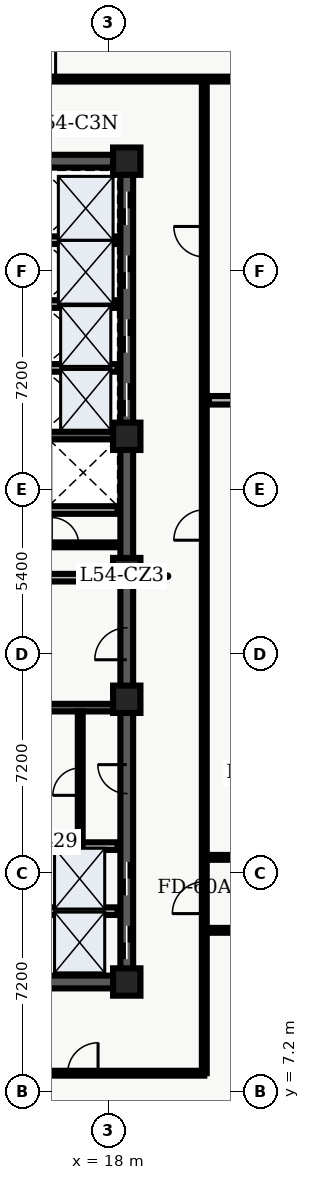
"""IFC4 building model, lengths in metres.
Left out: names, types, materials, properties, quantities, classifications, styles, units other than length and angle.
Written with IfcOpenShell. Run it as: python <this file> out.ifc"""

import sys

from ifc_helpers import new_model, entity, si_unit, converted_unit, direction, frame, origin_with_axes, origin_2d_with_axis, place, context, subcontext, project, spatial, polyline, rectangle, outline, extrude, element, fill, save


model = new_model("IFC4")
c1 = context("Model", 3, precision=1e-05, world=origin_with_axes(), true_north=direction((0.0, 1.0)))
c2 = subcontext(c1, "Body", "Model", "MODEL_VIEW")
j1 = project(units=[si_unit("LENGTHUNIT", "METRE"), converted_unit("PLANEANGLEUNIT", "DEGREE", entity("IfcPlaneAngleMeasure", 0.017), si_unit("PLANEANGLEUNIT", "RADIAN"), dimensions=[0, 0, 0, 0, 0, 0, 0])], contexts=[c1])
p1 = place(None, origin_with_axes())
s1 = spatial("IfcSite", under=j1, at=p1, CompositionType="ELEMENT")
p2 = place(p1, origin_with_axes())
s2 = spatial("IfcBuilding", under=s1, at=p2, CompositionType="ELEMENT")
p3 = place(p2, frame((0.0, 0.0, 219.9), z_axis=(0.0, 0.0, 1.0), x_axis=(1.0, 0.0, 0.0)))
s3 = spatial("IfcBuildingStorey", under=s2, at=p3, CompositionType="ELEMENT", Elevation=219.9)
p4 = place(p3, frame((11.4, 10.8, 0.0), z_axis=(0.0, 0.0, 1.0), x_axis=(1.0, 0.0, 0.0)))
e1 = element("IfcWall", 1, at=p4, inside=s3, PredefinedType="SHEAR", context=c2, shape_type="SweptSolid", body=[
    extrude(outline(polyline([(0.0, -0.21), (7.2, -0.21), (7.2, 0.21), (0.0, 0.21), (0.0, -0.21)])), origin_with_axes(), (0.0, 0.0, 1.0), 4.56),
])
p5 = place(p4, frame((2.625, 0.0, 0.0), z_axis=(0.0, 0.0, 1.0), x_axis=(1.0, 0.0, 0.0)))
e2 = element("IfcOpeningElement", 2, at=p5, cuts=e1, PredefinedType="OPENING", context=c2, shape_type="SweptSolid", body=[
    extrude(rectangle(XDim=1.05, YDim=0.44, at=origin_2d_with_axis()), origin_with_axes(), (0.0, 0.0, 1.0), 2.15),
])
p6 = place(p3, frame((11.4, 37.8, 0.0), z_axis=(0.0, 0.0, 1.0), x_axis=(1.0, 0.0, 0.0)))
e3 = element("IfcWall", 3, at=p6, inside=s3, PredefinedType="SHEAR", context=c2, shape_type="SweptSolid", body=[
    extrude(outline(polyline([(0.0, -0.21), (7.2, -0.21), (7.2, 0.21), (0.0, 0.21), (0.0, -0.21)])), origin_with_axes(), (0.0, 0.0, 1.0), 4.56),
])
p7 = place(p6, frame((2.625, 0.0, 0.0), z_axis=(0.0, 0.0, 1.0), x_axis=(1.0, 0.0, 0.0)))
e4 = element("IfcOpeningElement", 4, at=p7, cuts=e3, PredefinedType="OPENING", context=c2, shape_type="SweptSolid", body=[
    extrude(rectangle(XDim=1.05, YDim=0.44, at=origin_2d_with_axis()), origin_with_axes(), (0.0, 0.0, 1.0), 2.15),
])
p8 = place(p3, frame((18.6, 10.8, 0.0), z_axis=(0.0, 0.0, 1.0), x_axis=(0.0, 1.0, 0.0)))
e5 = element("IfcWall", 5, at=p8, inside=s3, PredefinedType="SHEAR", context=c2, shape_type="SweptSolid", body=[
    extrude(outline(polyline([(0.0, -0.21), (13.5, -0.21), (13.5, 0.21), (0.0, 0.21), (0.0, -0.21)])), origin_with_axes(), (0.0, 0.0, 1.0), 4.56),
])
p9 = place(p8, frame((1.3, 0.0, 0.0), z_axis=(0.0, 0.0, 1.0), x_axis=(1.0, 0.0, 0.0)))
e6 = element("IfcOpeningElement", 6, at=p9, cuts=e5, PredefinedType="OPENING", context=c2, shape_type="SweptSolid", body=[
    extrude(rectangle(XDim=1.1, YDim=0.44, at=origin_2d_with_axis()), origin_with_axes(), (0.0, 0.0, 1.0), 2.15),
])
p10 = place(p8, frame((3.4, 0.0, 0.0), z_axis=(0.0, 0.0, 1.0), x_axis=(1.0, 0.0, 0.0)))
e7 = element("IfcOpeningElement", 7, at=p10, cuts=e5, PredefinedType="OPENING", context=c2, shape_type="SweptSolid", body=[
    extrude(rectangle(XDim=1.1, YDim=0.44, at=origin_2d_with_axis()), origin_with_axes(), (0.0, 0.0, 1.0), 2.15),
])
p11 = place(p8, frame((11.125, 0.0, 0.0), z_axis=(0.0, 0.0, 1.0), x_axis=(1.0, 0.0, 0.0)))
e8 = element("IfcOpeningElement", 8, at=p11, cuts=e5, PredefinedType="OPENING", context=c2, shape_type="SweptSolid", body=[
    extrude(rectangle(XDim=1.05, YDim=0.44, at=origin_2d_with_axis()), origin_with_axes(), (0.0, 0.0, 1.0), 2.15),
])
p12 = place(p8, frame((6.675, 0.0, 0.0), z_axis=(0.0, 0.0, 1.0), x_axis=(1.0, 0.0, 0.0)))
e9 = element("IfcOpeningElement", 9, at=p12, cuts=e5, PredefinedType="OPENING", context=c2, shape_type="SweptSolid", body=[
    extrude(rectangle(XDim=0.95, YDim=0.44, at=origin_2d_with_axis()), origin_with_axes(), (0.0, 0.0, 1.0), 2.15),
])
p13 = place(p3, frame((18.6, 24.3, 0.0), z_axis=(0.0, 0.0, 1.0), x_axis=(0.0, 1.0, 0.0)))
e10 = element("IfcWall", 10, at=p13, inside=s3, PredefinedType="SHEAR", context=c2, shape_type="SweptSolid", body=[
    extrude(outline(polyline([(0.0, -0.21), (13.5, -0.21), (13.5, 0.21), (0.0, 0.21), (0.0, -0.21)])), origin_with_axes(), (0.0, 0.0, 1.0), 4.56),
])
p14 = place(p13, frame((5.65, 0.0, 0.0), z_axis=(0.0, 0.0, 1.0), x_axis=(1.0, 0.0, 0.0)))
e11 = element("IfcOpeningElement", 11, at=p14, cuts=e10, PredefinedType="OPENING", context=c2, shape_type="SweptSolid", body=[
    extrude(rectangle(XDim=1.1, YDim=0.44, at=origin_2d_with_axis()), origin_with_axes(), (0.0, 0.0, 1.0), 2.15),
])
p15 = place(p13, frame((7.75, 0.0, 0.0), z_axis=(0.0, 0.0, 1.0), x_axis=(1.0, 0.0, 0.0)))
e12 = element("IfcOpeningElement", 12, at=p15, cuts=e10, PredefinedType="OPENING", context=c2, shape_type="SweptSolid", body=[
    extrude(rectangle(XDim=1.1, YDim=0.44, at=origin_2d_with_axis()), origin_with_axes(), (0.0, 0.0, 1.0), 2.15),
])
p16 = place(p13, frame((9.85, 0.0, 0.0), z_axis=(0.0, 0.0, 1.0), x_axis=(1.0, 0.0, 0.0)))
e13 = element("IfcOpeningElement", 13, at=p16, cuts=e10, PredefinedType="OPENING", context=c2, shape_type="SweptSolid", body=[
    extrude(rectangle(XDim=1.1, YDim=0.44, at=origin_2d_with_axis()), origin_with_axes(), (0.0, 0.0, 1.0), 2.15),
])
p17 = place(p13, frame((11.95, 0.0, 0.0), z_axis=(0.0, 0.0, 1.0), x_axis=(1.0, 0.0, 0.0)))
e14 = element("IfcOpeningElement", 14, at=p17, cuts=e10, PredefinedType="OPENING", context=c2, shape_type="SweptSolid", body=[
    extrude(rectangle(XDim=1.1, YDim=0.44, at=origin_2d_with_axis()), origin_with_axes(), (0.0, 0.0, 1.0), 2.15),
])
for number, where, z_axis, x_axis in (
    (15, (11.61, 19.825, 0.0), (0.0, 0.0, 1.0), (1.0, 0.0, 0.0)),
    (16, (11.61, 28.775, 0.0), (0.0, 0.0, 1.0), (1.0, 0.0, 0.0)),
):
    element("IfcWall", number, at=place(p3, frame(where, z_axis=z_axis, x_axis=x_axis)), inside=s3, PredefinedType="SHEAR", context=c2, shape_type="SweptSolid", body=[
        extrude(outline(polyline([(0.0, -0.125), (6.78, -0.125), (6.78, 0.125), (0.0, 0.125), (0.0, -0.125)])), origin_with_axes(), (0.0, 0.0, 1.0), 4.56),
    ])
p18 = place(p3, frame((11.7, 24.1, 0.0), z_axis=(0.0, 0.0, 1.0), x_axis=(1.0, 0.0, 0.0)))
e17 = element("IfcWall", 17, at=p18, inside=s3, PredefinedType="SOLIDWALL", context=c2, shape_type="SweptSolid", body=[
    extrude(outline(polyline([(0.0, -0.125), (6.6, -0.125), (6.6, 0.125), (0.0, 0.125), (0.0, -0.125)])), origin_with_axes(), (0.0, 0.0, 1.0), 3.6),
])
p19 = place(p18, frame((3.75, 0.0, 0.0), z_axis=(0.0, 0.0, 1.0), x_axis=(1.0, 0.0, 0.0)))
e18 = element("IfcOpeningElement", 18, at=p19, cuts=e17, PredefinedType="OPENING", context=c2, shape_type="SweptSolid", body=[
    extrude(rectangle(XDim=0.9, YDim=0.27, at=origin_2d_with_axis()), origin_with_axes(), (0.0, 0.0, 1.0), 2.15),
])
p20 = place(p3, frame((11.7, 26.325, 0.0), z_axis=(0.0, 0.0, 1.0), x_axis=(1.0, 0.0, 0.0)))
e19 = element("IfcWall", 19, at=p20, inside=s3, PredefinedType="SOLIDWALL", context=c2, shape_type="SweptSolid", body=[
    extrude(outline(polyline([(0.0, -0.125), (6.6, -0.125), (6.6, 0.125), (0.0, 0.125), (0.0, -0.125)])), origin_with_axes(), (0.0, 0.0, 1.0), 3.6),
])
p21 = place(p20, frame((3.5, 0.0, 0.0), z_axis=(0.0, 0.0, 1.0), x_axis=(1.0, 0.0, 0.0)))
e20 = element("IfcOpeningElement", 20, at=p21, cuts=e19, PredefinedType="OPENING", context=c2, shape_type="SweptSolid", body=[
    extrude(rectangle(XDim=0.9, YDim=0.27, at=origin_2d_with_axis()), origin_with_axes(), (0.0, 0.0, 1.0), 2.15),
])
for number, where, z_axis, x_axis in (
    (21, (18.6, 10.8, 0.0), (0.0, 0.0, 1.0), (1.0, 0.0, 0.0)),
    (22, (18.6, 20.1, 0.0), (0.0, 0.0, 1.0), (1.0, 0.0, 0.0)),
    (23, (18.6, 24.3, 0.0), (0.0, 0.0, 1.0), (1.0, 0.0, 0.0)),
    (24, (18.6, 28.75, 0.0), (0.0, 0.0, 1.0), (1.0, 0.0, 0.0)),
    (25, (18.6, 37.8, 0.0), (0.0, 0.0, 1.0), (1.0, 0.0, 0.0)),
):
    element("IfcColumn", number, at=place(p3, frame(where, z_axis=z_axis, x_axis=x_axis)), inside=s3, PredefinedType="COLUMN", context=c2, shape_type="SweptSolid", body=[
        extrude(rectangle(XDim=0.9, YDim=0.9, at=origin_2d_with_axis()), origin_with_axes(), (0.0, 0.0, 1.0), 4.8),
    ])
p22 = place(p3, frame((14.62, 25.18, 0.0), z_axis=(0.0, 0.0, 1.0), x_axis=(1.0, 0.0, 0.0)))
e26 = element("IfcWall", 26, at=p22, inside=s3, PredefinedType="PARTITIONING", context=c2, shape_type="SweptSolid", body=[
    extrude(outline(polyline([(0.0, -0.08), (3.68, -0.08), (3.68, 0.08), (0.0, 0.08), (0.0, -0.08)])), origin_with_axes(), (0.0, 0.0, 1.0), 3.2),
])
p23 = place(p22, frame((1.95, 0.0, 0.0), z_axis=(0.0, 0.0, 1.0), x_axis=(1.0, 0.0, 0.0)))
e27 = element("IfcOpeningElement", 27, at=p23, cuts=e26, PredefinedType="OPENING", context=c2, shape_type="SweptSolid", body=[
    extrude(rectangle(XDim=0.9, YDim=0.18, at=origin_2d_with_axis()), origin_with_axes(), (0.0, 0.0, 1.0), 2.15),
])
for number, where, z_axis, x_axis in (
    (28, (15.84, 13.13, 0.0), (0.0, 0.0, 1.0), (1.0, 0.0, 0.0)),
    (29, (15.84, 15.27, 0.0), (0.0, 0.0, 1.0), (1.0, 0.0, 0.0)),
):
    element("IfcWall", number, at=place(p3, frame(where, z_axis=z_axis, x_axis=x_axis)), inside=s3, PredefinedType="SOLIDWALL", context=c2, shape_type="SweptSolid", body=[
        extrude(outline(polyline([(0.0, -0.125), (2.46, -0.125), (2.46, 0.125), (0.0, 0.125), (0.0, -0.125)])), origin_with_axes(), (0.0, 0.0, 1.0), 3.2),
    ])
p24 = place(p3, frame((17.07, 15.34, 0.0), z_axis=(0.0, 0.0, 1.0), x_axis=(0.0, 1.0, 0.0)))
e30 = element("IfcWall", 30, at=p24, inside=s3, PredefinedType="PARTITIONING", context=c2, shape_type="SweptSolid", body=[
    extrude(outline(polyline([(0.0, -0.08), (4.36, -0.08), (4.36, 0.08), (0.0, 0.08), (0.0, -0.08)])), origin_with_axes(), (0.0, 0.0, 1.0), 3.2),
])
p25 = place(p24, frame((2.05, 0.0, 0.0), z_axis=(0.0, 0.0, 1.0), x_axis=(1.0, 0.0, 0.0)))
e31 = element("IfcOpeningElement", 31, at=p25, cuts=e30, PredefinedType="OPENING", context=c2, shape_type="SweptSolid", body=[
    extrude(rectangle(XDim=0.9, YDim=0.18, at=origin_2d_with_axis()), origin_with_axes(), (0.0, 0.0, 1.0), 2.15),
])
for number, where, z_axis, x_axis in (
    (32, (15.84, 31.0, 0.0), (0.0, 0.0, 1.0), (1.0, 0.0, 0.0)),
    (33, (15.84, 33.1, 0.0), (0.0, 0.0, 1.0), (1.0, 0.0, 0.0)),
    (34, (15.84, 35.2, 0.0), (0.0, 0.0, 1.0), (1.0, 0.0, 0.0)),
):
    element("IfcWall", number, at=place(p3, frame(where, z_axis=z_axis, x_axis=x_axis)), inside=s3, PredefinedType="SOLIDWALL", context=c2, shape_type="SweptSolid", body=[
        extrude(outline(polyline([(0.0, -0.125), (2.46, -0.125), (2.46, 0.125), (0.0, 0.125), (0.0, -0.125)])), origin_with_axes(), (0.0, 0.0, 1.0), 3.2),
    ])
p26 = place(p3, frame((7.1, 7.8, 0.0), z_axis=(0.0, 0.0, 1.0), x_axis=(1.0, 0.0, 0.0)))
e35 = element("IfcWall", 35, at=p26, inside=s3, PredefinedType="PARTITIONING", context=c2, shape_type="SweptSolid", body=[
    extrude(outline(polyline([(0.0, -0.08), (14.05, -0.08), (14.05, 0.08), (0.0, 0.08), (0.0, -0.08)])), origin_with_axes(), (0.0, 0.0, 1.0), 3.2),
])
p27 = place(p26, frame((3.051, 0.0, 0.0), z_axis=(0.0, 0.0, 1.0), x_axis=(1.0, 0.0, 0.0)))
e36 = element("IfcOpeningElement", 36, at=p27, cuts=e35, PredefinedType="OPENING", context=c2, shape_type="SweptSolid", body=[
    extrude(rectangle(XDim=1.0, YDim=0.18, at=origin_2d_with_axis()), origin_with_axes(), (0.0, 0.0, 1.0), 2.15),
])
p28 = place(p26, frame((10.056, 0.0, 0.0), z_axis=(0.0, 0.0, 1.0), x_axis=(1.0, 0.0, 0.0)))
e37 = element("IfcOpeningElement", 37, at=p28, cuts=e35, PredefinedType="OPENING", context=c2, shape_type="SweptSolid", body=[
    extrude(rectangle(XDim=1.0, YDim=0.18, at=origin_2d_with_axis()), origin_with_axes(), (0.0, 0.0, 1.0), 2.15),
])
p29 = place(p3, frame((7.1, 40.5, 0.0), z_axis=(0.0, 0.0, 1.0), x_axis=(1.0, 0.0, 0.0)))
e38 = element("IfcWall", 38, at=p29, inside=s3, PredefinedType="PARTITIONING", context=c2, shape_type="SweptSolid", body=[
    extrude(outline(polyline([(0.0, -0.08), (24.965, -0.08), (24.965, 0.08), (0.0, 0.08), (0.0, -0.08)])), origin_with_axes(), (0.0, 0.0, 1.0), 3.2),
])
p30 = place(p29, frame((3.395, 0.0, 0.0), z_axis=(0.0, 0.0, 1.0), x_axis=(1.0, 0.0, 0.0)))
e39 = element("IfcOpeningElement", 39, at=p30, cuts=e38, PredefinedType="OPENING", context=c2, shape_type="SweptSolid", body=[
    extrude(rectangle(XDim=1.0, YDim=0.18, at=origin_2d_with_axis()), origin_with_axes(), (0.0, 0.0, 1.0), 2.15),
])
p31 = place(p29, frame((8.66, 0.0, 0.0), z_axis=(0.0, 0.0, 1.0), x_axis=(1.0, 0.0, 0.0)))
e40 = element("IfcOpeningElement", 40, at=p31, cuts=e38, PredefinedType="OPENING", context=c2, shape_type="SweptSolid", body=[
    extrude(rectangle(XDim=1.0, YDim=0.18, at=origin_2d_with_axis()), origin_with_axes(), (0.0, 0.0, 1.0), 2.15),
])
p32 = place(p3, frame((21.15, 7.8, 0.0), z_axis=(0.0, 0.0, 1.0), x_axis=(0.0, 1.0, 0.0)))
e41 = element("IfcWall", 41, at=p32, inside=s3, PredefinedType="PARTITIONING", context=c2, shape_type="SweptSolid", body=[
    extrude(outline(polyline([(0.0, -0.08), (32.7, -0.08), (32.7, 0.08), (0.0, 0.08), (0.0, -0.08)])), origin_with_axes(), (0.0, 0.0, 1.0), 3.2),
])
p33 = place(p32, frame((18.032, 0.0, 0.0), z_axis=(0.0, 0.0, 1.0), x_axis=(1.0, 0.0, 0.0)))
e42 = element("IfcOpeningElement", 42, at=p33, cuts=e41, PredefinedType="OPENING", context=c2, shape_type="SweptSolid", body=[
    extrude(rectangle(XDim=1.0, YDim=0.18, at=origin_2d_with_axis()), origin_with_axes(), (0.0, 0.0, 1.0), 2.15),
])
p34 = place(p32, frame((27.352, 0.0, 0.0), z_axis=(0.0, 0.0, 1.0), x_axis=(1.0, 0.0, 0.0)))
e43 = element("IfcOpeningElement", 43, at=p34, cuts=e41, PredefinedType="OPENING", context=c2, shape_type="SweptSolid", body=[
    extrude(rectangle(XDim=1.0, YDim=0.18, at=origin_2d_with_axis()), origin_with_axes(), (0.0, 0.0, 1.0), 2.15),
])
p35 = place(p32, frame((5.775, 0.0, 0.0), z_axis=(0.0, 0.0, 1.0), x_axis=(1.0, 0.0, 0.0)))
e44 = element("IfcOpeningElement", 44, at=p35, cuts=e41, PredefinedType="OPENING", context=c2, shape_type="SweptSolid", body=[
    extrude(rectangle(XDim=1.05, YDim=0.18, at=origin_2d_with_axis()), origin_with_axes(), (0.0, 0.0, 1.0), 2.15),
])
p36 = place(p3, frame((21.3, 29.935, 0.0), z_axis=(0.0, 0.0, 1.0), x_axis=(1.0, 0.0, 0.0)))
e45 = element("IfcWall", 45, at=p36, inside=s3, PredefinedType="PARTITIONING", context=c2, shape_type="SweptSolid", body=[
    extrude(outline(polyline([(0.0, -0.14), (10.765, -0.14), (10.765, 0.14), (0.0, 0.14), (0.0, -0.14)])), origin_with_axes(), (0.0, 0.0, 1.0), 3.2),
])
p37 = place(p3, frame((21.15, 12.5, 0.0), z_axis=(0.0, 0.0, 1.0), x_axis=(1.0, 0.0, 0.0)))
e46 = element("IfcWall", 46, at=p37, inside=s3, PredefinedType="PARTITIONING", context=c2, shape_type="SweptSolid", body=[
    extrude(outline(polyline([(0.0, -0.08), (15.2, -0.08), (15.2, 0.08), (0.0, 0.08), (0.0, -0.08)])), origin_with_axes(), (0.0, 0.0, 1.0), 3.2),
])
p38 = place(p37, frame((7.65, 0.0, 0.0), z_axis=(0.0, 0.0, 1.0), x_axis=(1.0, 0.0, 0.0)))
e47 = element("IfcOpeningElement", 47, at=p38, cuts=e46, PredefinedType="OPENING", context=c2, shape_type="SweptSolid", body=[
    extrude(rectangle(XDim=1.0, YDim=0.18, at=origin_2d_with_axis()), origin_with_axes(), (0.0, 0.0, 1.0), 2.15),
])
p39 = place(p3, frame((21.15, 14.9, 0.0), z_axis=(0.0, 0.0, 1.0), x_axis=(1.0, 0.0, 0.0)))
e48 = element("IfcWall", 48, at=p39, inside=s3, PredefinedType="PARTITIONING", context=c2, shape_type="SweptSolid", body=[
    extrude(outline(polyline([(0.0, -0.08), (15.2, -0.08), (15.2, 0.08), (0.0, 0.08), (0.0, -0.08)])), origin_with_axes(), (0.0, 0.0, 1.0), 3.2),
])
p40 = place(p39, frame((3.583, 0.0, 0.0), z_axis=(0.0, 0.0, 1.0), x_axis=(1.0, 0.0, 0.0)))
e49 = element("IfcOpeningElement", 49, at=p40, cuts=e48, PredefinedType="OPENING", context=c2, shape_type="SweptSolid", body=[
    extrude(rectangle(XDim=1.0, YDim=0.18, at=origin_2d_with_axis()), origin_with_axes(), (0.0, 0.0, 1.0), 2.15),
])
p41 = place(p39, frame((11.053, 0.0, 0.0), z_axis=(0.0, 0.0, 1.0), x_axis=(1.0, 0.0, 0.0)))
e50 = element("IfcOpeningElement", 50, at=p41, cuts=e48, PredefinedType="OPENING", context=c2, shape_type="SweptSolid", body=[
    extrude(rectangle(XDim=1.0, YDim=0.18, at=origin_2d_with_axis()), origin_with_axes(), (0.0, 0.0, 1.0), 2.15),
])
p42 = place(p13, frame((5.65, 0.0, 0.0), z_axis=(0.0, 0.0, 1.0), x_axis=(1.0, 0.0, 0.0)))
e51 = element("IfcDoor", 51, at=p42, inside=s3, OperationType="SLIDING_TO_LEFT", PredefinedType="DOOR", context=c2, shape_type="SweptSolid", body=[
    extrude(rectangle(XDim=1.1, YDim=0.09, at=origin_2d_with_axis()), origin_with_axes(), (0.0, 0.0, 1.0), 2.15),
])
fill(e11, e51)
p43 = place(p13, frame((7.75, 0.0, 0.0), z_axis=(0.0, 0.0, 1.0), x_axis=(1.0, 0.0, 0.0)))
e52 = element("IfcDoor", 52, at=p43, inside=s3, OperationType="SLIDING_TO_RIGHT", PredefinedType="DOOR", context=c2, shape_type="SweptSolid", body=[
    extrude(rectangle(XDim=1.1, YDim=0.09, at=origin_2d_with_axis()), origin_with_axes(), (0.0, 0.0, 1.0), 2.15),
])
fill(e12, e52)
p44 = place(p13, frame((9.85, 0.0, 0.0), z_axis=(0.0, 0.0, 1.0), x_axis=(1.0, 0.0, 0.0)))
e53 = element("IfcDoor", 53, at=p44, inside=s3, OperationType="DOUBLE_DOOR_SLIDING", PredefinedType="DOOR", context=c2, shape_type="SweptSolid", body=[
    extrude(rectangle(XDim=1.1, YDim=0.09, at=origin_2d_with_axis()), origin_with_axes(), (0.0, 0.0, 1.0), 2.15),
])
fill(e13, e53)
p45 = place(p13, frame((11.95, 0.0, 0.0), z_axis=(0.0, 0.0, 1.0), x_axis=(1.0, 0.0, 0.0)))
e54 = element("IfcDoor", 54, at=p45, inside=s3, OperationType="DOUBLE_DOOR_SLIDING", PredefinedType="DOOR", context=c2, shape_type="SweptSolid", body=[
    extrude(rectangle(XDim=1.1, YDim=0.09, at=origin_2d_with_axis()), origin_with_axes(), (0.0, 0.0, 1.0), 2.15),
])
fill(e14, e54)
p46 = place(p8, frame((1.3, 0.0, 0.0), z_axis=(0.0, 0.0, 1.0), x_axis=(1.0, 0.0, 0.0)))
e55 = element("IfcDoor", 55, at=p46, inside=s3, OperationType="SLIDING_TO_LEFT", PredefinedType="DOOR", context=c2, shape_type="SweptSolid", body=[
    extrude(rectangle(XDim=1.1, YDim=0.09, at=origin_2d_with_axis()), origin_with_axes(), (0.0, 0.0, 1.0), 2.15),
])
fill(e6, e55)
p47 = place(p8, frame((3.4, 0.0, 0.0), z_axis=(0.0, 0.0, 1.0), x_axis=(1.0, 0.0, 0.0)))
e56 = element("IfcDoor", 56, at=p47, inside=s3, OperationType="SLIDING_TO_RIGHT", PredefinedType="DOOR", context=c2, shape_type="SweptSolid", body=[
    extrude(rectangle(XDim=1.1, YDim=0.09, at=origin_2d_with_axis()), origin_with_axes(), (0.0, 0.0, 1.0), 2.15),
])
fill(e7, e56)
p48 = place(p8, frame((11.125, 0.0, 0.0), z_axis=(0.0, 0.0, 1.0), x_axis=(1.0, 0.0, 0.0)))
e57 = element("IfcDoor", 57, at=p48, inside=s3, OperationType="SINGLE_SWING_LEFT", PredefinedType="DOOR", context=c2, shape_type="SweptSolid", body=[
    extrude(rectangle(XDim=1.05, YDim=0.09, at=origin_2d_with_axis()), origin_with_axes(), (0.0, 0.0, 1.0), 2.15),
])
fill(e8, e57)
p49 = place(p22, frame((1.95, 0.0, 0.0), z_axis=(0.0, 0.0, 1.0), x_axis=(1.0, 0.0, 0.0)))
e58 = element("IfcDoor", 58, at=p49, inside=s3, OperationType="SINGLE_SWING_LEFT", PredefinedType="DOOR", context=c2, shape_type="SweptSolid", body=[
    extrude(rectangle(XDim=0.9, YDim=0.09, at=origin_2d_with_axis()), origin_with_axes(), (0.0, 0.0, 1.0), 2.15),
])
fill(e27, e58)
p50 = place(p24, frame((2.05, 0.0, 0.0), z_axis=(0.0, 0.0, 1.0), x_axis=(1.0, 0.0, 0.0)))
e59 = element("IfcDoor", 59, at=p50, inside=s3, OperationType="SINGLE_SWING_LEFT", PredefinedType="DOOR", context=c2, shape_type="SweptSolid", body=[
    extrude(rectangle(XDim=0.9, YDim=0.09, at=origin_2d_with_axis()), origin_with_axes(), (0.0, 0.0, 1.0), 2.15),
])
fill(e31, e59)
p51 = place(p8, frame((6.675, 0.0, 0.0), z_axis=(0.0, 0.0, 1.0), x_axis=(1.0, 0.0, 0.0)))
e60 = element("IfcDoor", 60, at=p51, inside=s3, OperationType="SINGLE_SWING_RIGHT", PredefinedType="DOOR", context=c2, shape_type="SweptSolid", body=[
    extrude(rectangle(XDim=0.95, YDim=0.09, at=origin_2d_with_axis()), origin_with_axes(), (0.0, 0.0, 1.0), 2.15),
])
fill(e9, e60)
p52 = place(p26, frame((10.056, 0.0, 0.0), z_axis=(0.0, 0.0, 1.0), x_axis=(1.0, 0.0, 0.0)))
e61 = element("IfcDoor", 61, at=p52, inside=s3, OperationType="SINGLE_SWING_RIGHT", PredefinedType="DOOR", context=c2, shape_type="SweptSolid", body=[
    extrude(rectangle(XDim=1.0, YDim=0.09, at=origin_2d_with_axis()), origin_with_axes(), (0.0, 0.0, 1.0), 2.15),
])
fill(e37, e61)
p53 = place(p29, frame((8.66, 0.0, 0.0), z_axis=(0.0, 0.0, 1.0), x_axis=(1.0, 0.0, 0.0)))
e62 = element("IfcDoor", 62, at=p53, inside=s3, OperationType="SINGLE_SWING_RIGHT", PredefinedType="DOOR", context=c2, shape_type="SweptSolid", body=[
    extrude(rectangle(XDim=1.0, YDim=0.09, at=origin_2d_with_axis()), origin_with_axes(), (0.0, 0.0, 1.0), 2.15),
])
fill(e40, e62)
p54 = place(p32, frame((18.032, 0.0, 0.0), z_axis=(0.0, 0.0, 1.0), x_axis=(1.0, 0.0, 0.0)))
e63 = element("IfcDoor", 63, at=p54, inside=s3, OperationType="SINGLE_SWING_LEFT", PredefinedType="DOOR", context=c2, shape_type="SweptSolid", body=[
    extrude(rectangle(XDim=1.0, YDim=0.09, at=origin_2d_with_axis()), origin_with_axes(), (0.0, 0.0, 1.0), 2.15),
])
fill(e42, e63)
p55 = place(p32, frame((27.352, 0.0, 0.0), z_axis=(0.0, 0.0, 1.0), x_axis=(1.0, 0.0, 0.0)))
e64 = element("IfcDoor", 64, at=p55, inside=s3, OperationType="SINGLE_SWING_RIGHT", PredefinedType="DOOR", context=c2, shape_type="SweptSolid", body=[
    extrude(rectangle(XDim=1.0, YDim=0.09, at=origin_2d_with_axis()), origin_with_axes(), (0.0, 0.0, 1.0), 2.15),
])
fill(e43, e64)
p56 = place(p32, frame((5.775, 0.0, 0.0), z_axis=(0.0, 0.0, 1.0), x_axis=(1.0, 0.0, 0.0)))
e65 = element("IfcDoor", 65, at=p56, inside=s3, OperationType="SINGLE_SWING_LEFT", PredefinedType="DOOR", context=c2, shape_type="SweptSolid", body=[
    extrude(rectangle(XDim=1.05, YDim=0.09, at=origin_2d_with_axis()), origin_with_axes(), (0.0, 0.0, 1.0), 2.15),
])
fill(e44, e65)
save(model, sys.argv[1])
